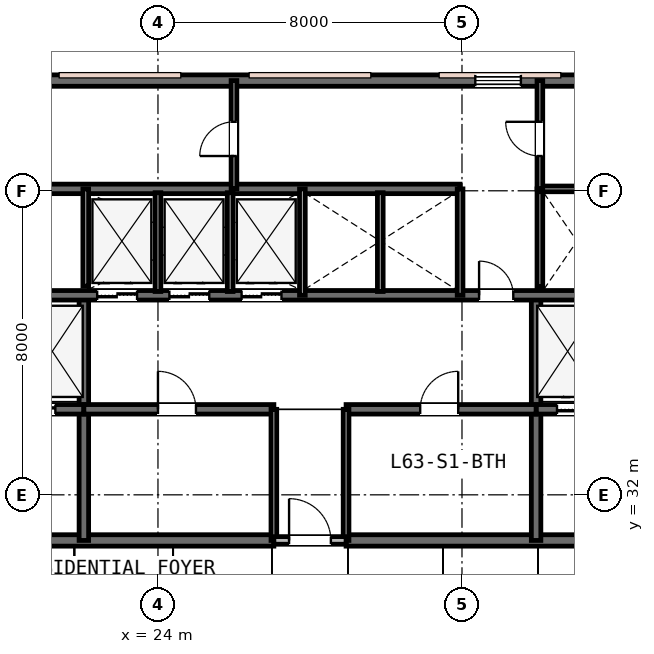
"""IFC4 building model, lengths in metres.
Left out: names, types, materials, properties, quantities, classifications, styles, units other than length and angle.
Written with IfcOpenShell. Run it as: python <this file> out.ifc"""

import sys

from ifc_helpers import new_model, si_unit, direction, frame, frame_2d, origin, place, context, subcontext, project, spatial, rectangle, extrude, element, fill, save


model = new_model("IFC4")
c1 = context("Model", 3, precision=1e-05, world=origin(), true_north=direction((0.0, 1.0)))
c2 = subcontext(c1, "Body", "Model", "MODEL_VIEW")
j1 = project(units=[si_unit("LENGTHUNIT", "METRE"), si_unit("PLANEANGLEUNIT", "RADIAN")], contexts=[c1])
p1 = place(None, origin())
s1 = spatial("IfcSite", under=j1, at=p1, CompositionType="ELEMENT")
p2 = place(p1, origin())
s2 = spatial("IfcBuilding", under=s1, at=p2, CompositionType="ELEMENT")
p3 = place(p2, frame((0.0, 0.0, 245.0)))
s3 = spatial("IfcBuildingStorey", under=s2, at=p3, CompositionType="ELEMENT", Elevation=245.0)
p4 = place(p3, frame((15.85, 42.9, 0.0), z_axis=(0.0, 0.0, 1.0), x_axis=(1.0, 0.0, 0.0)))
e1 = element("IfcWall", 1, at=p4, inside=s3, PredefinedType="SHEAR", context=c2, shape_type="SweptSolid", body=[
    extrude(rectangle(XDim=24.3, YDim=0.3, at=frame_2d((12.15, 0.0))), origin(), (0.0, 0.0, 1.0), 3.8),
])
p5 = place(p4, frame((1.6, 0.0, 0.95)))
e2 = element("IfcOpeningElement", 2, at=p5, cuts=e1, PredefinedType="OPENING", context=c2, shape_type="SweptSolid", body=[
    extrude(rectangle(XDim=1.2, YDim=1.6, at=frame_2d((0.6, 0.8))), frame((0.0, 0.16, 0.0), z_axis=(0.0, -1.0, 0.0), x_axis=(1.0, 0.0, 0.0)), (0.0, 0.0, 1.0), 0.32),
])
p6 = place(p4, frame((16.5, 0.0, 0.95)))
e3 = element("IfcOpeningElement", 3, at=p6, cuts=e1, PredefinedType="OPENING", context=c2, shape_type="SweptSolid", body=[
    extrude(rectangle(XDim=1.2, YDim=1.6, at=frame_2d((0.6, 0.8))), frame((0.0, 0.16, 0.0), z_axis=(0.0, -1.0, 0.0), x_axis=(1.0, 0.0, 0.0)), (0.0, 0.0, 1.0), 0.32),
])
p7 = place(p4, frame((21.6, 0.0, 0.95)))
e4 = element("IfcOpeningElement", 4, at=p7, cuts=e1, PredefinedType="OPENING", context=c2, shape_type="SweptSolid", body=[
    extrude(rectangle(XDim=1.2, YDim=1.6, at=frame_2d((0.6, 0.8))), frame((0.0, 0.16, 0.0), z_axis=(0.0, -1.0, 0.0), x_axis=(1.0, 0.0, 0.0)), (0.0, 0.0, 1.0), 0.32),
])
p8 = place(p3, frame((15.85, 30.8, 0.0), z_axis=(0.0, 0.0, 1.0), x_axis=(1.0, 0.0, 0.0)))
e5 = element("IfcWall", 5, at=p8, inside=s3, PredefinedType="SHEAR", context=c2, shape_type="SweptSolid", body=[
    extrude(rectangle(XDim=11.2, YDim=0.3, at=frame_2d((5.6, 0.0))), origin(), (0.0, 0.0, 1.0), 3.8),
])
p9 = place(p8, frame((2.45, 0.0, 0.0)))
e6 = element("IfcOpeningElement", 6, at=p9, cuts=e5, PredefinedType="OPENING", context=c2, shape_type="SweptSolid", body=[
    extrude(rectangle(XDim=1.1, YDim=2.15, at=frame_2d((0.55, 1.075))), frame((0.0, 0.16, 0.0), z_axis=(0.0, -1.0, 0.0), x_axis=(1.0, 0.0, 0.0)), (0.0, 0.0, 1.0), 0.32),
])
p10 = place(p3, frame((28.95, 30.8, 0.0), z_axis=(0.0, 0.0, 1.0), x_axis=(1.0, 0.0, 0.0)))
e7 = element("IfcWall", 7, at=p10, inside=s3, PredefinedType="SHEAR", context=c2, shape_type="SweptSolid", body=[
    extrude(rectangle(XDim=11.2, YDim=0.3, at=frame_2d((5.6, 0.0))), origin(), (0.0, 0.0, 1.0), 3.8),
])
p11 = place(p10, frame((7.65, 0.0, 0.0)))
e8 = element("IfcOpeningElement", 8, at=p11, cuts=e7, PredefinedType="OPENING", context=c2, shape_type="SweptSolid", body=[
    extrude(rectangle(XDim=1.1, YDim=2.15, at=frame_2d((0.55, 1.075))), frame((0.0, 0.16, 0.0), z_axis=(0.0, -1.0, 0.0), x_axis=(1.0, 0.0, 0.0)), (0.0, 0.0, 1.0), 0.32),
])
for number, where, z_axis, x_axis in (
    (9, (22.05, 30.8, 0.0), (0.0, 0.0, 1.0), (0.0, 1.0, 0.0)),
    (10, (33.95, 30.8, 0.0), (0.0, 0.0, 1.0), (0.0, 1.0, 0.0)),
):
    element("IfcWall", number, at=place(p3, frame(where, z_axis=z_axis, x_axis=x_axis)), inside=s3, PredefinedType="SHEAR", context=c2, shape_type="SweptSolid", body=[
        extrude(rectangle(XDim=6.45, YDim=0.25, at=frame_2d((3.225, 0.0))), origin(), (0.0, 0.0, 1.0), 3.8),
    ])
p12 = place(p3, frame((16.0, 34.25, 0.0), z_axis=(0.0, 0.0, 1.0), x_axis=(1.0, 0.0, 0.0)))
e11 = element("IfcWall", 11, at=p12, inside=s3, PredefinedType="SHEAR", context=c2, shape_type="SweptSolid", body=[
    extrude(rectangle(XDim=6.05, YDim=0.25, at=frame_2d((3.025, 0.0))), origin(), (0.0, 0.0, 1.0), 3.8),
])
p13 = place(p12, frame((1.25, 0.0, 0.0)))
e12 = element("IfcOpeningElement", 12, at=p13, cuts=e11, PredefinedType="OPENING", context=c2, shape_type="SweptSolid", body=[
    extrude(rectangle(XDim=1.0, YDim=2.15, at=frame_2d((0.5, 1.075))), frame((0.0, 0.135, 0.0), z_axis=(0.0, -1.0, 0.0), x_axis=(1.0, 0.0, 0.0)), (0.0, 0.0, 1.0), 0.27),
])
p14 = place(p12, frame((4.2, 0.0, 0.0)))
e13 = element("IfcOpeningElement", 13, at=p14, cuts=e11, PredefinedType="OPENING", context=c2, shape_type="SweptSolid", body=[
    extrude(rectangle(XDim=1.1, YDim=2.15, at=frame_2d((0.55, 1.075))), frame((0.0, 0.135, 0.0), z_axis=(0.0, -1.0, 0.0), x_axis=(1.0, 0.0, 0.0)), (0.0, 0.0, 1.0), 0.27),
])
p15 = place(p3, frame((33.95, 34.25, 0.0), z_axis=(0.0, 0.0, 1.0), x_axis=(1.0, 0.0, 0.0)))
e14 = element("IfcWall", 14, at=p15, inside=s3, PredefinedType="SHEAR", context=c2, shape_type="SweptSolid", body=[
    extrude(rectangle(XDim=6.05, YDim=0.25, at=frame_2d((3.025, 0.0))), origin(), (0.0, 0.0, 1.0), 3.8),
])
p16 = place(p15, frame((3.7, 0.0, 0.0)))
e15 = element("IfcOpeningElement", 15, at=p16, cuts=e14, PredefinedType="OPENING", context=c2, shape_type="SweptSolid", body=[
    extrude(rectangle(XDim=1.0, YDim=2.15, at=frame_2d((0.5, 1.075))), frame((0.0, 0.135, 0.0), z_axis=(0.0, -1.0, 0.0), x_axis=(1.0, 0.0, 0.0)), (0.0, 0.0, 1.0), 0.27),
])
p17 = place(p15, frame((0.55, 0.0, 0.0)))
e16 = element("IfcOpeningElement", 16, at=p17, cuts=e14, PredefinedType="OPENING", context=c2, shape_type="SweptSolid", body=[
    extrude(rectangle(XDim=1.1, YDim=2.15, at=frame_2d((0.55, 1.075))), frame((0.0, 0.135, 0.0), z_axis=(0.0, -1.0, 0.0), x_axis=(1.0, 0.0, 0.0)), (0.0, 0.0, 1.0), 0.27),
])
p18 = place(p3, frame((22.05, 34.25, 0.0), z_axis=(0.0, 0.0, 1.0), x_axis=(1.0, 0.0, 0.0)))
e17 = element("IfcWall", 17, at=p18, inside=s3, PredefinedType="SHEAR", context=c2, shape_type="SweptSolid", body=[
    extrude(rectangle(XDim=5.0, YDim=0.25, at=frame_2d((2.5, 0.0))), origin(), (0.0, 0.0, 1.0), 3.8),
])
p19 = place(p18, frame((1.95, 0.0, 0.0)))
e18 = element("IfcOpeningElement", 18, at=p19, cuts=e17, PredefinedType="OPENING", context=c2, shape_type="SweptSolid", body=[
    extrude(rectangle(XDim=1.0, YDim=2.15, at=frame_2d((0.5, 1.075))), frame((0.0, 0.135, 0.0), z_axis=(0.0, -1.0, 0.0), x_axis=(1.0, 0.0, 0.0)), (0.0, 0.0, 1.0), 0.27),
])
p20 = place(p3, frame((28.95, 34.25, 0.0), z_axis=(0.0, 0.0, 1.0), x_axis=(1.0, 0.0, 0.0)))
e19 = element("IfcWall", 19, at=p20, inside=s3, PredefinedType="SHEAR", context=c2, shape_type="SweptSolid", body=[
    extrude(rectangle(XDim=5.0, YDim=0.25, at=frame_2d((2.5, 0.0))), origin(), (0.0, 0.0, 1.0), 3.8),
])
p21 = place(p20, frame((1.95, 0.0, 0.0)))
e20 = element("IfcOpeningElement", 20, at=p21, cuts=e19, PredefinedType="OPENING", context=c2, shape_type="SweptSolid", body=[
    extrude(rectangle(XDim=1.0, YDim=2.15, at=frame_2d((0.5, 1.075))), frame((0.0, 0.135, 0.0), z_axis=(0.0, -1.0, 0.0), x_axis=(1.0, 0.0, 0.0)), (0.0, 0.0, 1.0), 0.27),
])
p22 = place(p3, frame((19.9, 37.25, 0.0), z_axis=(0.0, 0.0, 1.0), x_axis=(1.0, 0.0, 0.0)))
e21 = element("IfcWall", 21, at=p22, inside=s3, PredefinedType="SHEAR", context=c2, shape_type="SweptSolid", body=[
    extrude(rectangle(XDim=16.2, YDim=0.25, at=frame_2d((8.1, 0.0))), origin(), (0.0, 0.0, 1.0), 3.8),
])
p23 = place(p22, frame((12.55, 0.0, 0.0)))
e22 = element("IfcOpeningElement", 22, at=p23, cuts=e21, PredefinedType="OPENING", context=c2, shape_type="SweptSolid", body=[
    extrude(rectangle(XDim=0.9, YDim=2.15, at=frame_2d((0.45, 1.075))), frame((0.0, 0.135, 0.0), z_axis=(0.0, -1.0, 0.0), x_axis=(1.0, 0.0, 0.0)), (0.0, 0.0, 1.0), 0.27),
])
p24 = place(p22, frame((2.5, 0.0, 0.0)))
e23 = element("IfcOpeningElement", 23, at=p24, cuts=e21, PredefinedType="OPENING", context=c2, shape_type="SweptSolid", body=[
    extrude(rectangle(XDim=1.05, YDim=2.15, at=frame_2d((0.525, 1.075))), frame((0.0, 0.135, 0.0), z_axis=(0.0, -1.0, 0.0), x_axis=(1.0, 0.0, 0.0)), (0.0, 0.0, 1.0), 0.27),
])
p25 = place(p22, frame((4.4, 0.0, 0.0)))
e24 = element("IfcOpeningElement", 24, at=p25, cuts=e21, PredefinedType="OPENING", context=c2, shape_type="SweptSolid", body=[
    extrude(rectangle(XDim=1.05, YDim=2.15, at=frame_2d((0.525, 1.075))), frame((0.0, 0.135, 0.0), z_axis=(0.0, -1.0, 0.0), x_axis=(1.0, 0.0, 0.0)), (0.0, 0.0, 1.0), 0.27),
])
p26 = place(p22, frame((6.3, 0.0, 0.0)))
e25 = element("IfcOpeningElement", 25, at=p26, cuts=e21, PredefinedType="OPENING", context=c2, shape_type="SweptSolid", body=[
    extrude(rectangle(XDim=1.05, YDim=2.15, at=frame_2d((0.525, 1.075))), frame((0.0, 0.135, 0.0), z_axis=(0.0, -1.0, 0.0), x_axis=(1.0, 0.0, 0.0)), (0.0, 0.0, 1.0), 0.27),
])
p27 = place(p3, frame((19.9, 40.05, 0.0), z_axis=(0.0, 0.0, 1.0), x_axis=(1.0, 0.0, 0.0)))
e26 = element("IfcWall", 26, at=p27, inside=s3, PredefinedType="SHEAR", context=c2, shape_type="SweptSolid", body=[
    extrude(rectangle(XDim=12.05, YDim=0.25, at=frame_2d((6.025, 0.0))), origin(), (0.0, 0.0, 1.0), 3.8),
])
for number, where, z_axis, x_axis in (
    (27, (27.05, 30.8, 0.0), (0.0, 0.0, 1.0), (0.0, 1.0, 0.0)),
    (28, (28.95, 30.8, 0.0), (0.0, 0.0, 1.0), (0.0, 1.0, 0.0)),
):
    element("IfcWall", number, at=place(p3, frame(where, z_axis=z_axis, x_axis=x_axis)), inside=s3, PredefinedType="PLUMBINGWALL", context=c2, shape_type="SweptSolid", body=[
        extrude(rectangle(XDim=3.45, YDim=0.15, at=frame_2d((1.725, 0.0))), origin(), (0.0, 0.0, 1.0), 3.28),
    ])
p28 = place(p3, frame((27.05, 30.8, 0.0), z_axis=(0.0, 0.0, 1.0), x_axis=(1.0, 0.0, 0.0)))
e29 = element("IfcWall", 29, at=p28, inside=s3, PredefinedType="PARTITIONING", context=c2, shape_type="SweptSolid", body=[
    extrude(rectangle(XDim=1.9, YDim=0.2, at=frame_2d((0.95, 0.0))), origin(), (0.0, 0.0, 1.0), 3.28),
])
p29 = place(p28, frame((0.4, 0.0, 0.0)))
e30 = element("IfcOpeningElement", 30, at=p29, cuts=e29, PredefinedType="OPENING", context=c2, shape_type="SweptSolid", body=[
    extrude(rectangle(XDim=1.1, YDim=2.15, at=frame_2d((0.55, 1.075))), frame((0.0, 0.11, 0.0), z_axis=(0.0, -1.0, 0.0), x_axis=(1.0, 0.0, 0.0)), (0.0, 0.0, 1.0), 0.22),
])
p30 = place(p3, frame((22.1, 37.49, 0.0), z_axis=(0.0, 0.0, 1.0), x_axis=(0.0, 1.0, 0.0)))
e31 = element("IfcWall", 31, at=p30, inside=s3, PredefinedType="PLUMBINGWALL", context=c2, shape_type="SweptSolid", body=[
    extrude(rectangle(XDim=2.56, YDim=0.15, at=frame_2d((1.28, 0.0))), origin(), (0.0, 0.0, 1.0), 3.53),
])
p31 = place(p3, frame((27.8, 37.25, 0.0), z_axis=(0.0, 0.0, 1.0), x_axis=(0.0, 1.0, 0.0)))
e32 = element("IfcWall", 32, at=p31, inside=s3, PredefinedType="PLUMBINGWALL", context=c2, shape_type="SweptSolid", body=[
    extrude(rectangle(XDim=2.8, YDim=0.15, at=frame_2d((1.4, 0.0))), origin(), (0.0, 0.0, 1.0), 3.53),
])
for number, where, z_axis, x_axis in (
    (33, (24.0, 37.35, 0.0), (0.0, 0.0, 1.0), (0.0, 1.0, 0.0)),
    (34, (25.9, 37.35, 0.0), (0.0, 0.0, 1.0), (0.0, 1.0, 0.0)),
):
    element("IfcWall", number, at=place(p3, frame(where, z_axis=z_axis, x_axis=x_axis)), inside=s3, PredefinedType="PLUMBINGWALL", context=c2, shape_type="SweptSolid", body=[
        extrude(rectangle(XDim=2.6, YDim=0.15, at=frame_2d((1.3, 0.0))), origin(), (0.0, 0.0, 1.0), 3.53),
    ])
p32 = place(p3, frame((31.95, 37.25, 0.0), z_axis=(0.0, 0.0, 1.0), x_axis=(0.0, 1.0, 0.0)))
e35 = element("IfcWall", 35, at=p32, inside=s3, PredefinedType="PLUMBINGWALL", context=c2, shape_type="SweptSolid", body=[
    extrude(rectangle(XDim=2.8, YDim=0.15, at=frame_2d((1.4, 0.0))), origin(), (0.0, 0.0, 1.0), 3.53),
])
p33 = place(p3, frame((29.85, 37.35, 0.0), z_axis=(0.0, 0.0, 1.0), x_axis=(0.0, 1.0, 0.0)))
e36 = element("IfcWall", 36, at=p33, inside=s3, PredefinedType="PLUMBINGWALL", context=c2, shape_type="SweptSolid", body=[
    extrude(rectangle(XDim=2.6, YDim=0.15, at=frame_2d((1.3, 0.0))), origin(), (0.0, 0.0, 1.0), 3.53),
])
p34 = place(p3, frame((34.05, 37.473, 0.0), z_axis=(0.0, 0.0, 1.0), x_axis=(0.0, 1.0, 0.0)))
e37 = element("IfcWall", 37, at=p34, inside=s3, PredefinedType="PLUMBINGWALL", context=c2, shape_type="SweptSolid", body=[
    extrude(rectangle(XDim=2.577, YDim=0.15, at=frame_2d((1.288, 0.0))), origin(), (0.0, 0.0, 1.0), 3.53),
])
p35 = place(p3, frame((34.05, 40.05, 0.0), z_axis=(0.0, 0.0, 1.0), x_axis=(1.0, 0.0, 0.0)))
e38 = element("IfcWall", 38, at=p35, inside=s3, PredefinedType="PARTITIONING", context=c2, shape_type="SweptSolid", body=[
    extrude(rectangle(XDim=2.05, YDim=0.15, at=frame_2d((1.025, 0.0))), origin(), (0.0, 0.0, 1.0), 3.53),
])
p36 = place(p3, frame((34.05, 40.05, 0.0), z_axis=(0.0, 0.0, 1.0), x_axis=(0.0, 1.0, 0.0)))
e39 = element("IfcWall", 39, at=p36, inside=s3, PredefinedType="PARTITIONING", context=c2, shape_type="SweptSolid", body=[
    extrude(rectangle(XDim=2.85, YDim=0.15, at=frame_2d((1.425, 0.0))), origin(), (0.0, 0.0, 1.0), 3.53),
])
p37 = place(p36, frame((0.865, 0.0, 0.0)))
e40 = element("IfcOpeningElement", 40, at=p37, cuts=e39, PredefinedType="OPENING", context=c2, shape_type="SweptSolid", body=[
    extrude(rectangle(XDim=0.9, YDim=2.15, at=frame_2d((0.45, 1.075))), frame((0.0, 0.085, 0.0), z_axis=(0.0, -1.0, 0.0), x_axis=(1.0, 0.0, 0.0)), (0.0, 0.0, 1.0), 0.17),
])
p38 = place(p3, frame((26.0, 40.05, 0.0), z_axis=(0.0, 0.0, 1.0), x_axis=(0.0, 1.0, 0.0)))
e41 = element("IfcWall", 41, at=p38, inside=s3, PredefinedType="PARTITIONING", context=c2, shape_type="SweptSolid", body=[
    extrude(rectangle(XDim=2.85, YDim=0.15, at=frame_2d((1.425, 0.0))), origin(), (0.0, 0.0, 1.0), 3.53),
])
p39 = place(p38, frame((0.865, 0.0, 0.0)))
e42 = element("IfcOpeningElement", 42, at=p39, cuts=e41, PredefinedType="OPENING", context=c2, shape_type="SweptSolid", body=[
    extrude(rectangle(XDim=0.9, YDim=2.15, at=frame_2d((0.45, 1.075))), frame((0.0, 0.085, 0.0), z_axis=(0.0, -1.0, 0.0), x_axis=(1.0, 0.0, 0.0)), (0.0, 0.0, 1.0), 0.17),
])
p40 = place(p6, origin())
e43 = element("IfcWindow", 43, at=p40, inside=s3, PartitioningType="SINGLE_PANEL", PredefinedType="WINDOW", context=c2, shape_type="SweptSolid", body=[
    extrude(rectangle(XDim=1.2, YDim=1.6, at=frame_2d((0.6, 0.8))), frame((0.0, 0.03, 0.0), z_axis=(0.0, -1.0, 0.0), x_axis=(1.0, 0.0, 0.0)), (0.0, 0.0, 1.0), 0.06),
])
fill(e3, e43)
p41 = place(p29, origin())
e44 = element("IfcDoor", 44, at=p41, inside=s3, OperationType="SINGLE_SWING_LEFT", PredefinedType="DOOR", context=c2, shape_type="SweptSolid", body=[
    extrude(rectangle(XDim=1.1, YDim=2.15, at=frame_2d((0.55, 1.075))), frame((0.0, 0.025, 0.0), z_axis=(0.0, -1.0, 0.0), x_axis=(1.0, 0.0, 0.0)), (0.0, 0.0, 1.0), 0.05),
])
fill(e30, e44)
p42 = place(p19, origin())
e45 = element("IfcDoor", 45, at=p42, inside=s3, OperationType="SINGLE_SWING_LEFT", PredefinedType="DOOR", context=c2, shape_type="SweptSolid", body=[
    extrude(rectangle(XDim=1.0, YDim=2.15, at=frame_2d((0.5, 1.075))), frame((0.0, 0.025, 0.0), z_axis=(0.0, -1.0, 0.0), x_axis=(1.0, 0.0, 0.0)), (0.0, 0.0, 1.0), 0.05),
])
fill(e18, e45)
p43 = place(p21, origin())
e46 = element("IfcDoor", 46, at=p43, inside=s3, OperationType="SINGLE_SWING_RIGHT", PredefinedType="DOOR", context=c2, shape_type="SweptSolid", body=[
    extrude(rectangle(XDim=1.0, YDim=2.15, at=frame_2d((0.5, 1.075))), frame((0.0, 0.025, 0.0), z_axis=(0.0, -1.0, 0.0), x_axis=(1.0, 0.0, 0.0)), (0.0, 0.0, 1.0), 0.05),
])
fill(e20, e46)
p44 = place(p23, origin())
e47 = element("IfcDoor", 47, at=p44, inside=s3, OperationType="SINGLE_SWING_LEFT", PredefinedType="DOOR", context=c2, shape_type="SweptSolid", body=[
    extrude(rectangle(XDim=0.9, YDim=2.15, at=frame_2d((0.45, 1.075))), frame((0.0, 0.025, 0.0), z_axis=(0.0, -1.0, 0.0), x_axis=(1.0, 0.0, 0.0)), (0.0, 0.0, 1.0), 0.05),
])
fill(e22, e47)
p45 = place(p37, origin())
e48 = element("IfcDoor", 48, at=p45, inside=s3, OperationType="SINGLE_SWING_RIGHT", PredefinedType="DOOR", context=c2, shape_type="SweptSolid", body=[
    extrude(rectangle(XDim=0.9, YDim=2.15, at=frame_2d((0.45, 1.075))), frame((0.0, 0.025, 0.0), z_axis=(0.0, -1.0, 0.0), x_axis=(1.0, 0.0, 0.0)), (0.0, 0.0, 1.0), 0.05),
])
fill(e40, e48)
p46 = place(p39, origin())
e49 = element("IfcDoor", 49, at=p46, inside=s3, OperationType="SINGLE_SWING_LEFT", PredefinedType="DOOR", context=c2, shape_type="SweptSolid", body=[
    extrude(rectangle(XDim=0.9, YDim=2.15, at=frame_2d((0.45, 1.075))), frame((0.0, 0.025, 0.0), z_axis=(0.0, -1.0, 0.0), x_axis=(1.0, 0.0, 0.0)), (0.0, 0.0, 1.0), 0.05),
])
fill(e42, e49)
p47 = place(p14, origin())
e50 = element("IfcDoor", 50, at=p47, inside=s3, OperationType="DOUBLE_DOOR_SLIDING", PredefinedType="DOOR", context=c2, shape_type="SweptSolid", body=[
    extrude(rectangle(XDim=1.1, YDim=2.15, at=frame_2d((0.55, 1.075))), frame((0.0, 0.025, 0.0), z_axis=(0.0, -1.0, 0.0), x_axis=(1.0, 0.0, 0.0)), (0.0, 0.0, 1.0), 0.05),
])
fill(e13, e50)
p48 = place(p17, origin())
e51 = element("IfcDoor", 51, at=p48, inside=s3, OperationType="DOUBLE_DOOR_SLIDING", PredefinedType="DOOR", context=c2, shape_type="SweptSolid", body=[
    extrude(rectangle(XDim=1.1, YDim=2.15, at=frame_2d((0.55, 1.075))), frame((0.0, 0.025, 0.0), z_axis=(0.0, -1.0, 0.0), x_axis=(1.0, 0.0, 0.0)), (0.0, 0.0, 1.0), 0.05),
])
fill(e16, e51)
p49 = place(p24, origin())
e52 = element("IfcDoor", 52, at=p49, inside=s3, OperationType="DOUBLE_DOOR_SLIDING", PredefinedType="DOOR", context=c2, shape_type="SweptSolid", body=[
    extrude(rectangle(XDim=1.05, YDim=2.15, at=frame_2d((0.525, 1.075))), frame((0.0, 0.025, 0.0), z_axis=(0.0, -1.0, 0.0), x_axis=(1.0, 0.0, 0.0)), (0.0, 0.0, 1.0), 0.05),
])
fill(e23, e52)
p50 = place(p25, origin())
e53 = element("IfcDoor", 53, at=p50, inside=s3, OperationType="DOUBLE_DOOR_SLIDING", PredefinedType="DOOR", context=c2, shape_type="SweptSolid", body=[
    extrude(rectangle(XDim=1.05, YDim=2.15, at=frame_2d((0.525, 1.075))), frame((0.0, 0.025, 0.0), z_axis=(0.0, -1.0, 0.0), x_axis=(1.0, 0.0, 0.0)), (0.0, 0.0, 1.0), 0.05),
])
fill(e24, e53)
p51 = place(p26, origin())
e54 = element("IfcDoor", 54, at=p51, inside=s3, OperationType="DOUBLE_DOOR_SLIDING", PredefinedType="DOOR", context=c2, shape_type="SweptSolid", body=[
    extrude(rectangle(XDim=1.05, YDim=2.15, at=frame_2d((0.525, 1.075))), frame((0.0, 0.025, 0.0), z_axis=(0.0, -1.0, 0.0), x_axis=(1.0, 0.0, 0.0)), (0.0, 0.0, 1.0), 0.05),
])
fill(e25, e54)
save(model, sys.argv[1])
